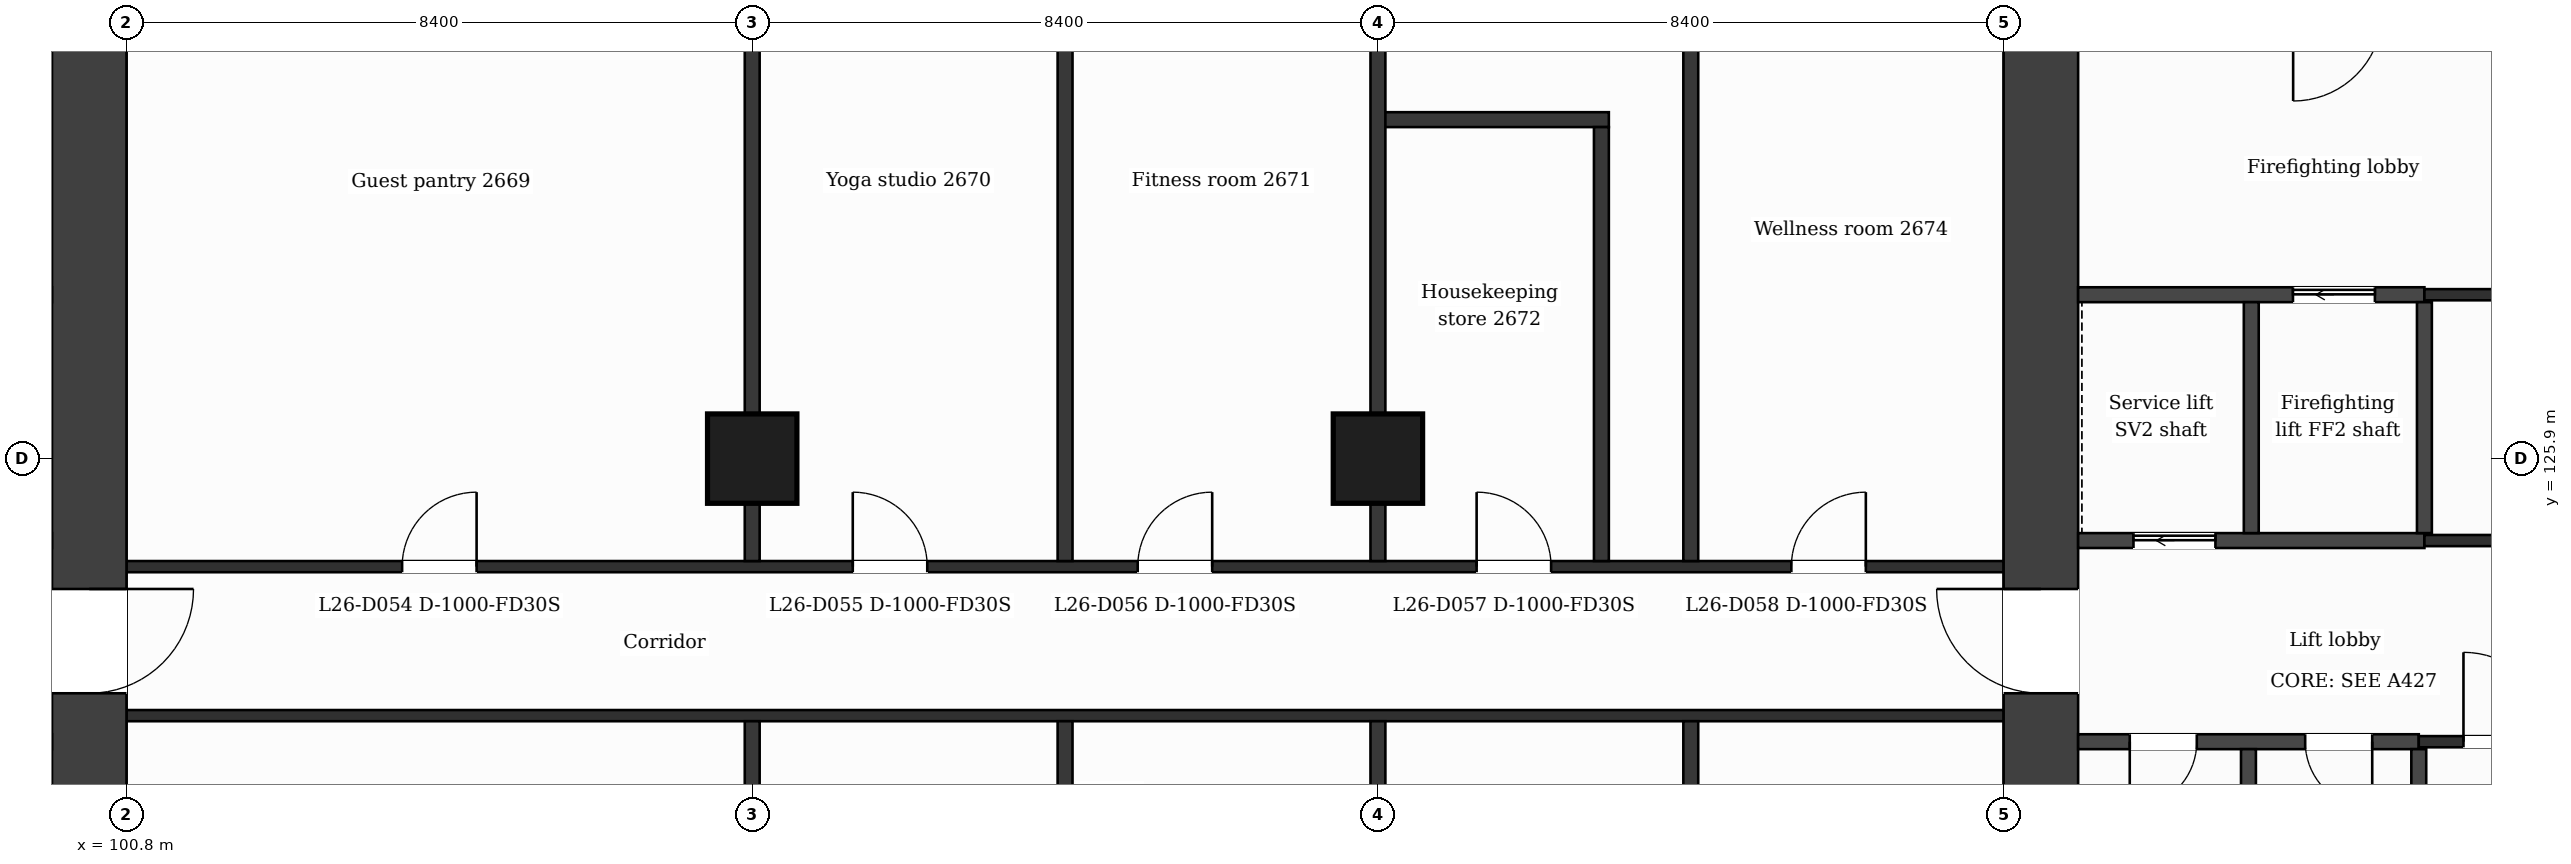
"""IFC4 building model, lengths in metres.
Left out: names, types, materials, properties, quantities, classifications, styles, units other than length and angle.
Written with IfcOpenShell. Run it as: python <this file> out.ifc"""

import sys

from ifc_helpers import new_model, si_unit, direction, frame, frame_2d, origin, origin_2d, place, context, subcontext, project, spatial, rectangle, extrude, element, fill, save


model = new_model("IFC4")
c1 = context("Model", 3, precision=1e-05, world=origin(), true_north=direction((0.0, 1.0)))
c2 = subcontext(c1, "Body", "Model", "MODEL_VIEW")
j1 = project(units=[si_unit("LENGTHUNIT", "METRE"), si_unit("PLANEANGLEUNIT", "RADIAN")], contexts=[c1])
p1 = place(None, origin())
s1 = spatial("IfcSite", under=j1, at=p1, CompositionType="ELEMENT")
p2 = place(p1, origin())
s2 = spatial("IfcBuilding", under=s1, at=p2, CompositionType="ELEMENT")
p3 = place(p2, frame((0.0, 0.0, 113.2)))
s3 = spatial("IfcBuildingStorey", under=s2, at=p3, CompositionType="ELEMENT", Elevation=113.2)
p4 = place(p3, frame((100.3, 131.9, 0.0), z_axis=(0.0, 0.0, 1.0), x_axis=(0.0, -1.0, 0.0)))
e1 = element("IfcWall", 1, at=p4, inside=s3, PredefinedType="SHEAR", context=c2, shape_type="SweptSolid", body=[
    extrude(rectangle(XDim=21.0, YDim=1.0, at=frame_2d((10.5, 0.0))), origin(), (0.0, 0.0, 1.0), 3.7),
])
p5 = place(p4, frame((7.75, 0.0, 0.0)))
e2 = element("IfcOpeningElement", 2, at=p5, cuts=e1, PredefinedType="OPENING", context=c2, shape_type="SweptSolid", body=[
    extrude(rectangle(XDim=1.4, YDim=2.1, at=frame_2d((0.7, 1.05))), frame((0.0, 0.51, 0.0), z_axis=(0.0, -1.0, 0.0), x_axis=(1.0, 0.0, 0.0)), (0.0, 0.0, 1.0), 1.02),
])
p6 = place(p3, frame((126.5, 110.9, 0.0), z_axis=(0.0, 0.0, 1.0), x_axis=(0.0, 1.0, 0.0)))
e3 = element("IfcWall", 3, at=p6, inside=s3, PredefinedType="SHEAR", context=c2, shape_type="SweptSolid", body=[
    extrude(rectangle(XDim=21.0, YDim=1.0, at=frame_2d((10.5, 0.0))), origin(), (0.0, 0.0, 1.0), 3.7),
])
p7 = place(p6, frame((11.85, 0.0, 0.0)))
e4 = element("IfcOpeningElement", 4, at=p7, cuts=e3, PredefinedType="OPENING", context=c2, shape_type="SweptSolid", body=[
    extrude(rectangle(XDim=1.4, YDim=2.1, at=frame_2d((0.7, 1.05))), frame((0.0, 0.51, 0.0), z_axis=(0.0, -1.0, 0.0), x_axis=(1.0, 0.0, 0.0)), (0.0, 0.0, 1.0), 1.02),
])
for number, where, z_axis, x_axis in (
    (5, (109.2, 125.9, 0.0), (0.0, 0.0, 1.0), (1.0, 0.0, 0.0)),
    (6, (117.6, 125.9, 0.0), (0.0, 0.0, 1.0), (1.0, 0.0, 0.0)),
):
    element("IfcColumn", number, at=place(p3, frame(where, z_axis=z_axis, x_axis=x_axis)), inside=s3, PredefinedType="COLUMN", context=c2, shape_type="SweptSolid", body=[
        extrude(rectangle(XDim=1.2, YDim=1.2, at=origin_2d()), origin(), (0.0, 0.0, 1.0), 3.7),
    ])
p8 = place(p3, frame((95.227, 122.1, 0.0), z_axis=(0.0, 0.0, 1.0), x_axis=(1.0, 0.0, 0.0)))
e7 = element("IfcWall", 7, at=p8, inside=s3, PredefinedType="PARTITIONING", context=c2, shape_type="SweptSolid", body=[
    extrude(rectangle(XDim=4.573, YDim=0.2, at=frame_2d((2.287, 0.0))), origin(), (0.0, 0.0, 1.0), 3.38),
])
p9 = place(p8, frame((0.693, 0.0, 0.0)))
e8 = element("IfcOpeningElement", 8, at=p9, cuts=e7, PredefinedType="OPENING", context=c2, shape_type="SweptSolid", body=[
    extrude(rectangle(XDim=0.9, YDim=2.1, at=frame_2d((0.45, 1.05))), frame((0.0, 0.11, 0.0), z_axis=(0.0, -1.0, 0.0), x_axis=(1.0, 0.0, 0.0)), (0.0, 0.0, 1.0), 0.22),
])
p10 = place(p8, frame((3.151, 0.0, 0.0)))
e9 = element("IfcOpeningElement", 9, at=p10, cuts=e7, PredefinedType="OPENING", context=c2, shape_type="SweptSolid", body=[
    extrude(rectangle(XDim=0.9, YDim=2.1, at=frame_2d((0.45, 1.05))), frame((0.0, 0.11, 0.0), z_axis=(0.0, -1.0, 0.0), x_axis=(1.0, 0.0, 0.0)), (0.0, 0.0, 1.0), 0.22),
])
p11 = place(p3, frame((127.0, 122.1, 0.0), z_axis=(0.0, 0.0, 1.0), x_axis=(1.0, 0.0, 0.0)))
e10 = element("IfcWall", 10, at=p11, inside=s3, PredefinedType="PARTITIONING", context=c2, shape_type="SweptSolid", body=[
    extrude(rectangle(XDim=4.573, YDim=0.2, at=frame_2d((2.287, 0.0))), origin(), (0.0, 0.0, 1.0), 3.38),
])
p12 = place(p11, frame((3.048, 0.0, 0.0)))
e11 = element("IfcOpeningElement", 11, at=p12, cuts=e10, PredefinedType="OPENING", context=c2, shape_type="SweptSolid", body=[
    extrude(rectangle(XDim=0.9, YDim=2.1, at=frame_2d((0.45, 1.05))), frame((0.0, 0.11, 0.0), z_axis=(0.0, -1.0, 0.0), x_axis=(1.0, 0.0, 0.0)), (0.0, 0.0, 1.0), 0.22),
])
p13 = place(p11, frame((0.693, 0.0, 0.0)))
e12 = element("IfcOpeningElement", 12, at=p13, cuts=e10, PredefinedType="OPENING", context=c2, shape_type="SweptSolid", body=[
    extrude(rectangle(XDim=0.9, YDim=2.1, at=frame_2d((0.45, 1.05))), frame((0.0, 0.11, 0.0), z_axis=(0.0, -1.0, 0.0), x_axis=(1.0, 0.0, 0.0)), (0.0, 0.0, 1.0), 0.22),
])
p14 = place(p3, frame((131.573, 122.1, 0.0), z_axis=(0.0, 0.0, 1.0), x_axis=(1.0, 0.0, 0.0)))
e13 = element("IfcWall", 13, at=p14, inside=s3, PredefinedType="PARTITIONING", context=c2, shape_type="SweptSolid", body=[
    extrude(rectangle(XDim=2.4, YDim=0.15, at=frame_2d((1.2, 0.0))), origin(), (0.0, 0.0, 1.0), 3.38),
])
p15 = place(p14, frame((0.6, 0.0, 0.0)))
e14 = element("IfcOpeningElement", 14, at=p15, cuts=e13, PredefinedType="OPENING", context=c2, shape_type="SweptSolid", body=[
    extrude(rectangle(XDim=1.2, YDim=2.1, at=frame_2d((0.6, 1.05))), frame((0.0, 0.085, 0.0), z_axis=(0.0, -1.0, 0.0), x_axis=(1.0, 0.0, 0.0)), (0.0, 0.0, 1.0), 0.17),
])
p16 = place(p3, frame((100.8, 122.45, 0.0), z_axis=(0.0, 0.0, 1.0), x_axis=(1.0, 0.0, 0.0)))
e15 = element("IfcWall", 15, at=p16, inside=s3, PredefinedType="PARTITIONING", context=c2, shape_type="SweptSolid", body=[
    extrude(rectangle(XDim=25.2, YDim=0.15, at=frame_2d((12.6, 0.0))), origin(), (0.0, 0.0, 1.0), 3.38),
])
p17 = place(p3, frame((100.8, 124.45, 0.0), z_axis=(0.0, 0.0, 1.0), x_axis=(1.0, 0.0, 0.0)))
e16 = element("IfcWall", 16, at=p17, inside=s3, PredefinedType="PARTITIONING", context=c2, shape_type="SweptSolid", body=[
    extrude(rectangle(XDim=25.2, YDim=0.15, at=frame_2d((12.6, 0.0))), origin(), (0.0, 0.0, 1.0), 3.38),
])
p18 = place(p17, frame((3.7, 0.0, 0.0)))
e17 = element("IfcOpeningElement", 17, at=p18, cuts=e16, PredefinedType="OPENING", context=c2, shape_type="SweptSolid", body=[
    extrude(rectangle(XDim=1.0, YDim=2.1, at=frame_2d((0.5, 1.05))), frame((0.0, 0.085, 0.0), z_axis=(0.0, -1.0, 0.0), x_axis=(1.0, 0.0, 0.0)), (0.0, 0.0, 1.0), 0.17),
])
p19 = place(p17, frame((9.75, 0.0, 0.0)))
e18 = element("IfcOpeningElement", 18, at=p19, cuts=e16, PredefinedType="OPENING", context=c2, shape_type="SweptSolid", body=[
    extrude(rectangle(XDim=1.0, YDim=2.1, at=frame_2d((0.5, 1.05))), frame((0.0, 0.085, 0.0), z_axis=(0.0, -1.0, 0.0), x_axis=(1.0, 0.0, 0.0)), (0.0, 0.0, 1.0), 0.17),
])
p20 = place(p17, frame((13.575, 0.0, 0.0)))
e19 = element("IfcOpeningElement", 19, at=p20, cuts=e16, PredefinedType="OPENING", context=c2, shape_type="SweptSolid", body=[
    extrude(rectangle(XDim=1.0, YDim=2.1, at=frame_2d((0.5, 1.05))), frame((0.0, 0.085, 0.0), z_axis=(0.0, -1.0, 0.0), x_axis=(1.0, 0.0, 0.0)), (0.0, 0.0, 1.0), 0.17),
])
p21 = place(p17, frame((18.125, 0.0, 0.0)))
e20 = element("IfcOpeningElement", 20, at=p21, cuts=e16, PredefinedType="OPENING", context=c2, shape_type="SweptSolid", body=[
    extrude(rectangle(XDim=1.0, YDim=2.1, at=frame_2d((0.5, 1.05))), frame((0.0, 0.085, 0.0), z_axis=(0.0, -1.0, 0.0), x_axis=(1.0, 0.0, 0.0)), (0.0, 0.0, 1.0), 0.17),
])
p22 = place(p17, frame((22.35, 0.0, 0.0)))
e21 = element("IfcOpeningElement", 21, at=p22, cuts=e16, PredefinedType="OPENING", context=c2, shape_type="SweptSolid", body=[
    extrude(rectangle(XDim=1.0, YDim=2.1, at=frame_2d((0.5, 1.05))), frame((0.0, 0.085, 0.0), z_axis=(0.0, -1.0, 0.0), x_axis=(1.0, 0.0, 0.0)), (0.0, 0.0, 1.0), 0.17),
])
p23 = place(p3, frame((127.0, 124.8, 0.0), z_axis=(0.0, 0.0, 1.0), x_axis=(1.0, 0.0, 0.0)))
e22 = element("IfcWall", 22, at=p23, inside=s3, PredefinedType="PARTITIONING", context=c2, shape_type="SweptSolid", body=[
    extrude(rectangle(XDim=4.649, YDim=0.2, at=frame_2d((2.324, 0.0))), origin(), (0.0, 0.0, 1.0), 3.38),
])
p24 = place(p23, frame((0.743, 0.0, 0.0)))
e23 = element("IfcOpeningElement", 23, at=p24, cuts=e22, PredefinedType="OPENING", context=c2, shape_type="SweptSolid", body=[
    extrude(rectangle(XDim=1.1, YDim=2.1, at=frame_2d((0.55, 1.05))), frame((0.0, 0.11, 0.0), z_axis=(0.0, -1.0, 0.0), x_axis=(1.0, 0.0, 0.0)), (0.0, 0.0, 1.0), 0.22),
])
p25 = place(p3, frame((131.649, 124.8, 0.0), z_axis=(0.0, 0.0, 1.0), x_axis=(1.0, 0.0, 0.0)))
e24 = element("IfcWall", 24, at=p25, inside=s3, PredefinedType="PARTITIONING", context=c2, shape_type="SweptSolid", body=[
    extrude(rectangle(XDim=2.449, YDim=0.15, at=frame_2d((1.225, 0.0))), origin(), (0.0, 0.0, 1.0), 3.38),
])
p26 = place(p3, frame((127.0, 128.1, 0.0), z_axis=(0.0, 0.0, 1.0), x_axis=(1.0, 0.0, 0.0)))
e25 = element("IfcWall", 25, at=p26, inside=s3, PredefinedType="PARTITIONING", context=c2, shape_type="SweptSolid", body=[
    extrude(rectangle(XDim=4.649, YDim=0.2, at=frame_2d((2.324, 0.0))), origin(), (0.0, 0.0, 1.0), 3.38),
])
p27 = place(p26, frame((2.884, 0.0, 0.0)))
e26 = element("IfcOpeningElement", 26, at=p27, cuts=e25, PredefinedType="OPENING", context=c2, shape_type="SweptSolid", body=[
    extrude(rectangle(XDim=1.1, YDim=2.1, at=frame_2d((0.55, 1.05))), frame((0.0, 0.11, 0.0), z_axis=(0.0, -1.0, 0.0), x_axis=(1.0, 0.0, 0.0)), (0.0, 0.0, 1.0), 0.22),
])
p28 = place(p3, frame((131.649, 128.1, 0.0), z_axis=(0.0, 0.0, 1.0), x_axis=(1.0, 0.0, 0.0)))
e27 = element("IfcWall", 27, at=p28, inside=s3, PredefinedType="PARTITIONING", context=c2, shape_type="SweptSolid", body=[
    extrude(rectangle(XDim=2.324, YDim=0.15, at=frame_2d((1.162, 0.0))), origin(), (0.0, 0.0, 1.0), 3.38),
])
p29 = place(p3, frame((117.6, 130.45, 0.0), z_axis=(0.0, 0.0, 1.0), x_axis=(1.0, 0.0, 0.0)))
e28 = element("IfcWall", 28, at=p29, inside=s3, PredefinedType="PARTITIONING", context=c2, shape_type="SweptSolid", body=[
    extrude(rectangle(XDim=3.1, YDim=0.2, at=frame_2d((1.55, 0.0))), origin(), (0.0, 0.0, 1.0), 3.38),
])
p30 = place(p3, frame((109.2, 109.075, 0.0), z_axis=(0.0, 0.0, 1.0), x_axis=(0.0, 1.0, 0.0)))
e29 = element("IfcWall", 29, at=p30, inside=s3, PredefinedType="PARTITIONING", context=c2, shape_type="SweptSolid", body=[
    extrude(rectangle(XDim=13.3, YDim=0.2, at=frame_2d((6.65, 0.0))), origin(), (0.0, 0.0, 1.0), 3.38),
])
p31 = place(p3, frame((109.2, 124.525, 0.0), z_axis=(0.0, 0.0, 1.0), x_axis=(0.0, 1.0, 0.0)))
e30 = element("IfcWall", 30, at=p31, inside=s3, PredefinedType="PARTITIONING", context=c2, shape_type="SweptSolid", body=[
    extrude(rectangle(XDim=9.2, YDim=0.2, at=frame_2d((4.6, 0.0))), origin(), (0.0, 0.0, 1.0), 3.38),
])
p32 = place(p3, frame((113.4, 109.075, 0.0), z_axis=(0.0, 0.0, 1.0), x_axis=(0.0, 1.0, 0.0)))
e31 = element("IfcWall", 31, at=p32, inside=s3, PredefinedType="PARTITIONING", context=c2, shape_type="SweptSolid", body=[
    extrude(rectangle(XDim=13.3, YDim=0.2, at=frame_2d((6.65, 0.0))), origin(), (0.0, 0.0, 1.0), 3.38),
])
p33 = place(p3, frame((113.4, 124.525, 0.0), z_axis=(0.0, 0.0, 1.0), x_axis=(0.0, 1.0, 0.0)))
e32 = element("IfcWall", 32, at=p33, inside=s3, PredefinedType="PARTITIONING", context=c2, shape_type="SweptSolid", body=[
    extrude(rectangle(XDim=9.2, YDim=0.2, at=frame_2d((4.6, 0.0))), origin(), (0.0, 0.0, 1.0), 3.38),
])
p34 = place(p3, frame((117.6, 109.075, 0.0), z_axis=(0.0, 0.0, 1.0), x_axis=(0.0, 1.0, 0.0)))
e33 = element("IfcWall", 33, at=p34, inside=s3, PredefinedType="PARTITIONING", context=c2, shape_type="SweptSolid", body=[
    extrude(rectangle(XDim=13.3, YDim=0.2, at=frame_2d((6.65, 0.0))), origin(), (0.0, 0.0, 1.0), 3.38),
])
p35 = place(p3, frame((117.6, 124.525, 0.0), z_axis=(0.0, 0.0, 1.0), x_axis=(0.0, 1.0, 0.0)))
e34 = element("IfcWall", 34, at=p35, inside=s3, PredefinedType="PARTITIONING", context=c2, shape_type="SweptSolid", body=[
    extrude(rectangle(XDim=9.2, YDim=0.2, at=frame_2d((4.6, 0.0))), origin(), (0.0, 0.0, 1.0), 3.38),
])
p36 = place(p3, frame((120.6, 124.525, 0.0), z_axis=(0.0, 0.0, 1.0), x_axis=(0.0, 1.0, 0.0)))
e35 = element("IfcWall", 35, at=p36, inside=s3, PredefinedType="PARTITIONING", context=c2, shape_type="SweptSolid", body=[
    extrude(rectangle(XDim=5.825, YDim=0.2, at=frame_2d((2.913, 0.0))), origin(), (0.0, 0.0, 1.0), 3.38),
])
p37 = place(p3, frame((121.8, 109.075, 0.0), z_axis=(0.0, 0.0, 1.0), x_axis=(0.0, 1.0, 0.0)))
e36 = element("IfcWall", 36, at=p37, inside=s3, PredefinedType="PARTITIONING", context=c2, shape_type="SweptSolid", body=[
    extrude(rectangle(XDim=13.3, YDim=0.2, at=frame_2d((6.65, 0.0))), origin(), (0.0, 0.0, 1.0), 3.38),
])
p38 = place(p3, frame((121.8, 124.525, 0.0), z_axis=(0.0, 0.0, 1.0), x_axis=(0.0, 1.0, 0.0)))
e37 = element("IfcWall", 37, at=p38, inside=s3, PredefinedType="PARTITIONING", context=c2, shape_type="SweptSolid", body=[
    extrude(rectangle(XDim=9.2, YDim=0.2, at=frame_2d((4.6, 0.0))), origin(), (0.0, 0.0, 1.0), 3.38),
])
for number, where, z_axis, x_axis in (
    (38, (129.287, 118.9, 0.0), (0.0, 0.0, 1.0), (0.0, 1.0, 0.0)),
    (39, (129.324, 124.9, 0.0), (0.0, 0.0, 1.0), (0.0, 1.0, 0.0)),
):
    element("IfcWall", number, at=place(p3, frame(where, z_axis=z_axis, x_axis=x_axis)), inside=s3, PredefinedType="PARTITIONING", context=c2, shape_type="SweptSolid", body=[
        extrude(rectangle(XDim=3.1, YDim=0.2, at=frame_2d((1.55, 0.0))), origin(), (0.0, 0.0, 1.0), 3.38),
    ])
p39 = place(p3, frame((131.573, 116.97, 0.0), z_axis=(0.0, 0.0, 1.0), x_axis=(0.0, 1.0, 0.0)))
e40 = element("IfcWall", 40, at=p39, inside=s3, PredefinedType="PARTITIONING", context=c2, shape_type="SweptSolid", body=[
    extrude(rectangle(XDim=5.03, YDim=0.2, at=frame_2d((2.515, 0.0))), origin(), (0.0, 0.0, 1.0), 3.38),
])
p40 = place(p39, frame((0.58, 0.0, 0.0)))
e41 = element("IfcOpeningElement", 41, at=p40, cuts=e40, PredefinedType="OPENING", context=c2, shape_type="SweptSolid", body=[
    extrude(rectangle(XDim=0.9, YDim=2.1, at=frame_2d((0.45, 1.05))), frame((0.0, 0.11, 0.0), z_axis=(0.0, -1.0, 0.0), x_axis=(1.0, 0.0, 0.0)), (0.0, 0.0, 1.0), 0.22),
])
p41 = place(p3, frame((131.649, 124.9, 0.0), z_axis=(0.0, 0.0, 1.0), x_axis=(0.0, 1.0, 0.0)))
e42 = element("IfcWall", 42, at=p41, inside=s3, PredefinedType="PARTITIONING", context=c2, shape_type="SweptSolid", body=[
    extrude(rectangle(XDim=3.1, YDim=0.2, at=frame_2d((1.55, 0.0))), origin(), (0.0, 0.0, 1.0), 3.38),
])
p42 = place(p15, origin())
e43 = element("IfcDoor", 43, at=p42, inside=s3, OperationType="SINGLE_SWING_LEFT", PredefinedType="DOOR", context=c2, shape_type="SweptSolid", body=[
    extrude(rectangle(XDim=1.2, YDim=2.1, at=frame_2d((0.6, 1.05))), frame((0.0, 0.025, 0.0), z_axis=(0.0, -1.0, 0.0), x_axis=(1.0, 0.0, 0.0)), (0.0, 0.0, 1.0), 0.05),
])
fill(e14, e43)
p43 = place(p27, origin())
e44 = element("IfcDoor", 44, at=p43, inside=s3, OperationType="SLIDING_TO_LEFT", PredefinedType="DOOR", context=c2, shape_type="SweptSolid", body=[
    extrude(rectangle(XDim=1.1, YDim=2.1, at=frame_2d((0.55, 1.05))), frame((0.0, 0.025, 0.0), z_axis=(0.0, -1.0, 0.0), x_axis=(1.0, 0.0, 0.0)), (0.0, 0.0, 1.0), 0.05),
])
fill(e26, e44)
p44 = place(p24, origin())
e45 = element("IfcDoor", 45, at=p44, inside=s3, OperationType="SLIDING_TO_LEFT", PredefinedType="DOOR", context=c2, shape_type="SweptSolid", body=[
    extrude(rectangle(XDim=1.1, YDim=2.1, at=frame_2d((0.55, 1.05))), frame((0.0, 0.025, 0.0), z_axis=(0.0, -1.0, 0.0), x_axis=(1.0, 0.0, 0.0)), (0.0, 0.0, 1.0), 0.05),
])
fill(e23, e45)
p45 = place(p12, origin())
e46 = element("IfcDoor", 46, at=p45, inside=s3, OperationType="SINGLE_SWING_RIGHT", PredefinedType="DOOR", context=c2, shape_type="SweptSolid", body=[
    extrude(rectangle(XDim=0.9, YDim=2.1, at=frame_2d((0.45, 1.05))), frame((0.0, 0.025, 0.0), z_axis=(0.0, -1.0, 0.0), x_axis=(1.0, 0.0, 0.0)), (0.0, 0.0, 1.0), 0.05),
])
fill(e11, e46)
p46 = place(p13, origin())
e47 = element("IfcDoor", 47, at=p46, inside=s3, OperationType="SINGLE_SWING_LEFT", PredefinedType="DOOR", context=c2, shape_type="SweptSolid", body=[
    extrude(rectangle(XDim=0.9, YDim=2.1, at=frame_2d((0.45, 1.05))), frame((0.0, 0.025, 0.0), z_axis=(0.0, -1.0, 0.0), x_axis=(1.0, 0.0, 0.0)), (0.0, 0.0, 1.0), 0.05),
])
fill(e12, e47)
p47 = place(p18, origin())
e48 = element("IfcDoor", 48, at=p47, inside=s3, OperationType="SINGLE_SWING_RIGHT", PredefinedType="DOOR", context=c2, shape_type="SweptSolid", body=[
    extrude(rectangle(XDim=1.0, YDim=2.1, at=frame_2d((0.5, 1.05))), frame((0.0, 0.025, 0.0), z_axis=(0.0, -1.0, 0.0), x_axis=(1.0, 0.0, 0.0)), (0.0, 0.0, 1.0), 0.05),
])
fill(e17, e48)
p48 = place(p19, origin())
e49 = element("IfcDoor", 49, at=p48, inside=s3, OperationType="SINGLE_SWING_LEFT", PredefinedType="DOOR", context=c2, shape_type="SweptSolid", body=[
    extrude(rectangle(XDim=1.0, YDim=2.1, at=frame_2d((0.5, 1.05))), frame((0.0, 0.025, 0.0), z_axis=(0.0, -1.0, 0.0), x_axis=(1.0, 0.0, 0.0)), (0.0, 0.0, 1.0), 0.05),
])
fill(e18, e49)
p49 = place(p20, origin())
e50 = element("IfcDoor", 50, at=p49, inside=s3, OperationType="SINGLE_SWING_RIGHT", PredefinedType="DOOR", context=c2, shape_type="SweptSolid", body=[
    extrude(rectangle(XDim=1.0, YDim=2.1, at=frame_2d((0.5, 1.05))), frame((0.0, 0.025, 0.0), z_axis=(0.0, -1.0, 0.0), x_axis=(1.0, 0.0, 0.0)), (0.0, 0.0, 1.0), 0.05),
])
fill(e19, e50)
p50 = place(p21, origin())
e51 = element("IfcDoor", 51, at=p50, inside=s3, OperationType="SINGLE_SWING_LEFT", PredefinedType="DOOR", context=c2, shape_type="SweptSolid", body=[
    extrude(rectangle(XDim=1.0, YDim=2.1, at=frame_2d((0.5, 1.05))), frame((0.0, 0.025, 0.0), z_axis=(0.0, -1.0, 0.0), x_axis=(1.0, 0.0, 0.0)), (0.0, 0.0, 1.0), 0.05),
])
fill(e20, e51)
p51 = place(p22, origin())
e52 = element("IfcDoor", 52, at=p51, inside=s3, OperationType="SINGLE_SWING_RIGHT", PredefinedType="DOOR", context=c2, shape_type="SweptSolid", body=[
    extrude(rectangle(XDim=1.0, YDim=2.1, at=frame_2d((0.5, 1.05))), frame((0.0, 0.025, 0.0), z_axis=(0.0, -1.0, 0.0), x_axis=(1.0, 0.0, 0.0)), (0.0, 0.0, 1.0), 0.05),
])
fill(e21, e52)
p52 = place(p5, origin())
e53 = element("IfcDoor", 53, at=p52, inside=s3, OperationType="SINGLE_SWING_LEFT", PredefinedType="DOOR", context=c2, shape_type="SweptSolid", body=[
    extrude(rectangle(XDim=1.4, YDim=2.1, at=frame_2d((0.7, 1.05))), frame((0.0, 0.025, 0.0), z_axis=(0.0, -1.0, 0.0), x_axis=(1.0, 0.0, 0.0)), (0.0, 0.0, 1.0), 0.05),
])
fill(e2, e53)
p53 = place(p7, origin())
e54 = element("IfcDoor", 54, at=p53, inside=s3, OperationType="SINGLE_SWING_RIGHT", PredefinedType="DOOR", context=c2, shape_type="SweptSolid", body=[
    extrude(rectangle(XDim=1.4, YDim=2.1, at=frame_2d((0.7, 1.05))), frame((0.0, 0.025, 0.0), z_axis=(0.0, -1.0, 0.0), x_axis=(1.0, 0.0, 0.0)), (0.0, 0.0, 1.0), 0.05),
])
fill(e4, e54)
save(model, sys.argv[1])
